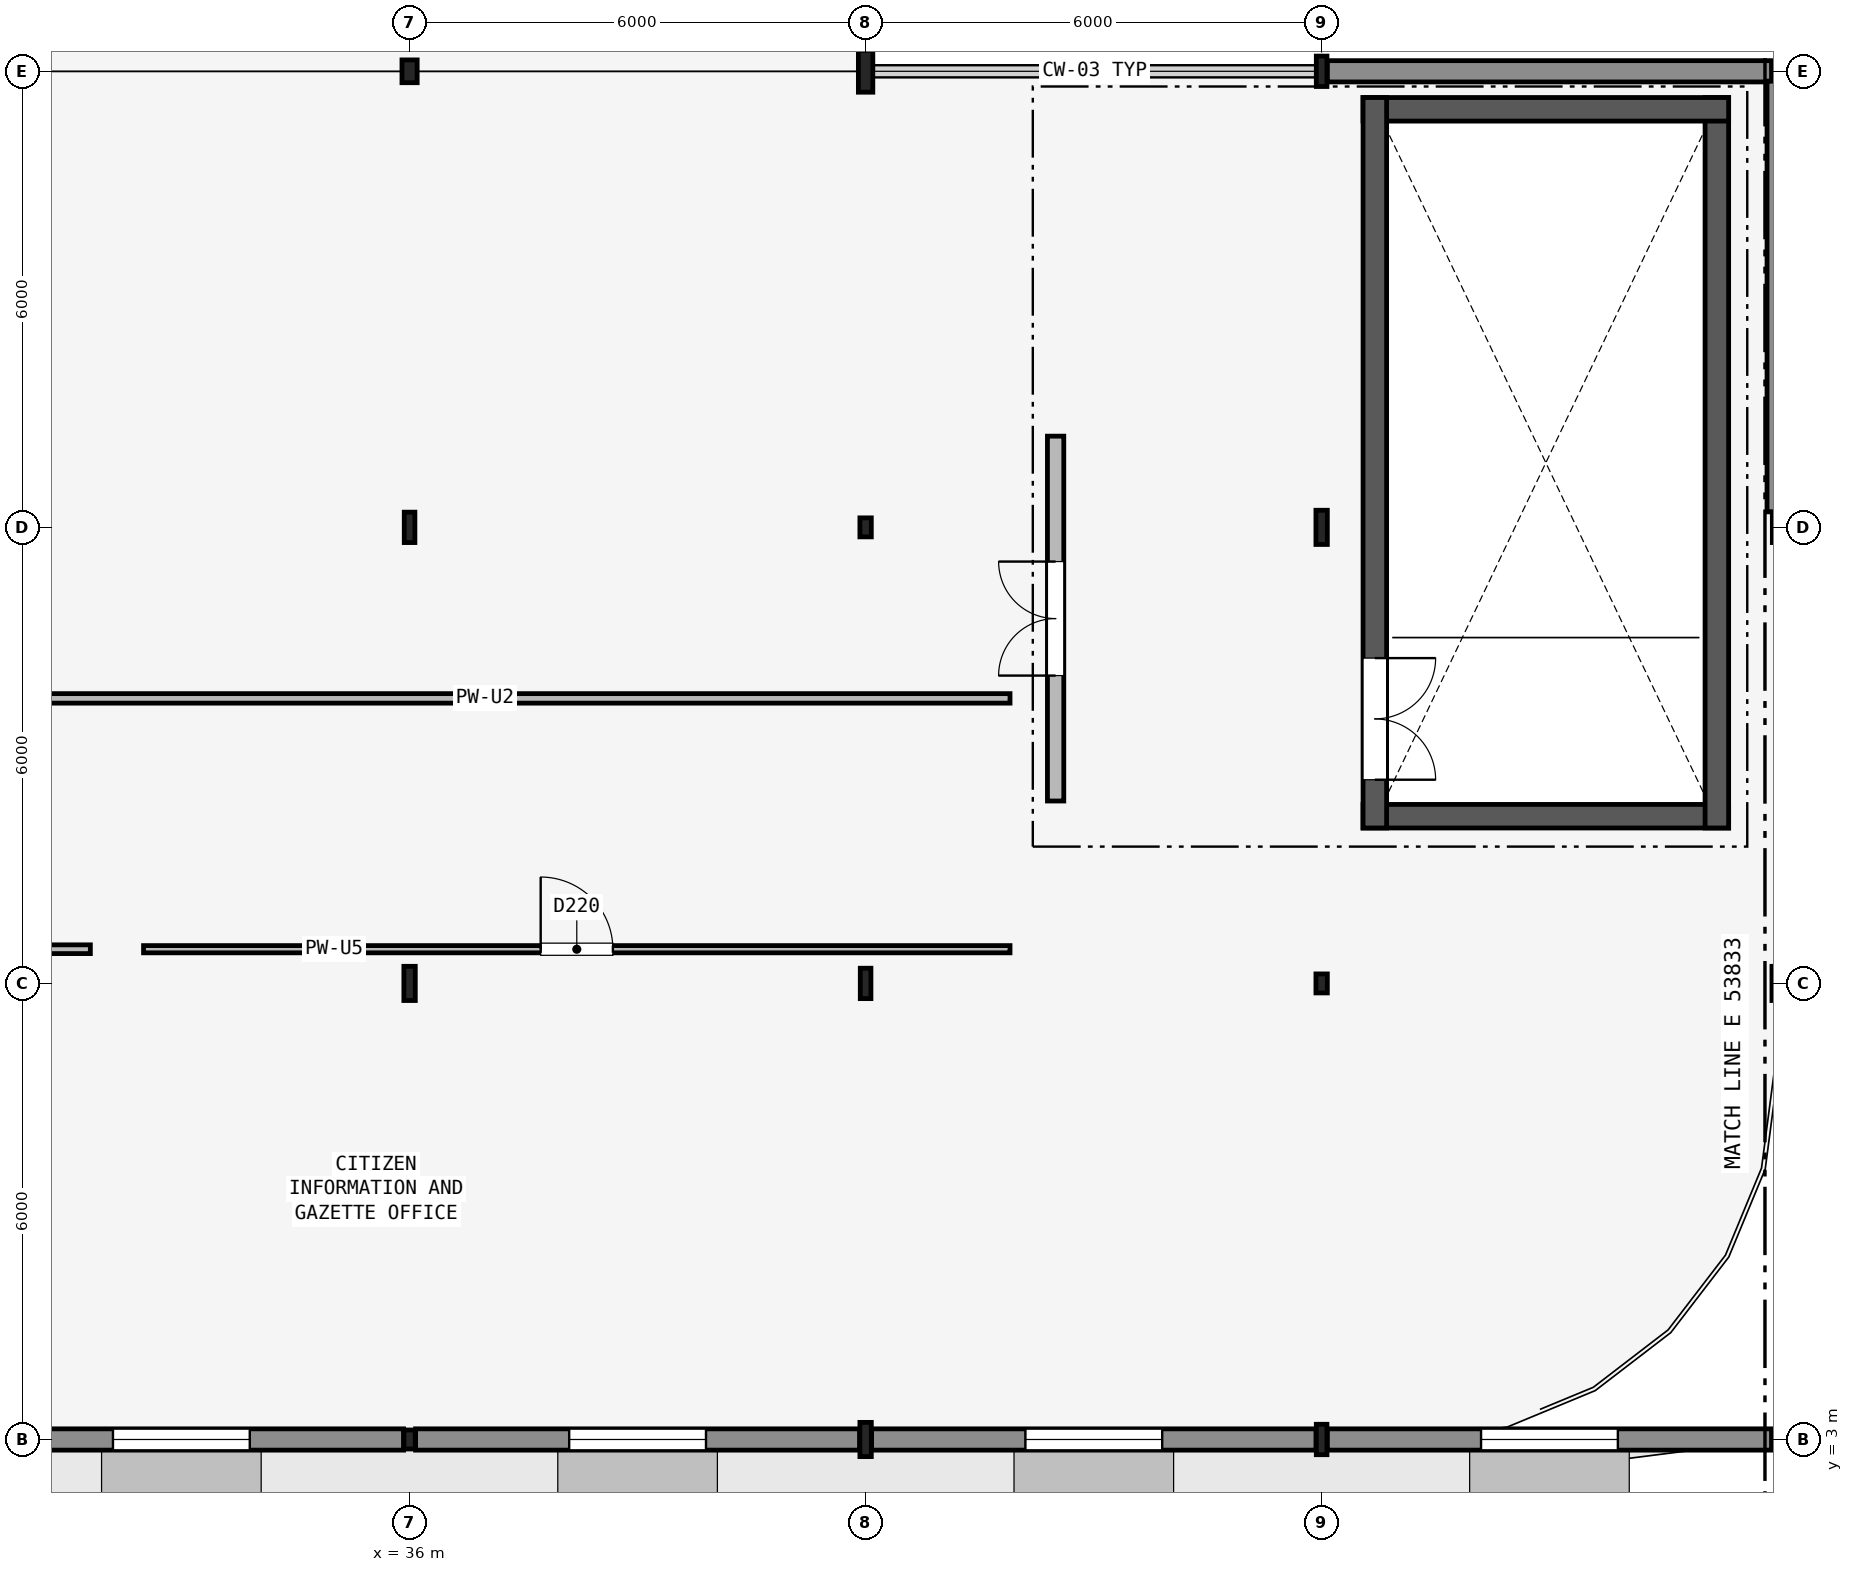
"""IFC4 building model, lengths in metres.
Left out: names, types, materials, properties, quantities, classifications, styles, units other than length and angle.
Written with IfcOpenShell. Run it as: python <this file> out.ifc"""

import sys

from ifc_helpers import new_model, si_unit, direction, frame, frame_2d, origin, origin_2d, place, context, subcontext, project, spatial, rectangle, hollow_rectangle, i_section, extrude, element, fill, save


model = new_model("IFC4")
c1 = context("Model", 3, precision=1e-05, world=origin(), true_north=direction((0.0, 1.0)))
c2 = subcontext(c1, "Body", "Model", "MODEL_VIEW")
j1 = project(units=[si_unit("LENGTHUNIT", "METRE"), si_unit("PLANEANGLEUNIT", "RADIAN")], contexts=[c1])
p1 = place(None, origin())
s1 = spatial("IfcSite", under=j1, at=p1, CompositionType="ELEMENT")
p2 = place(p1, origin())
s2 = spatial("IfcBuilding", under=s1, at=p2, CompositionType="ELEMENT")
p3 = place(p2, frame((0.0, 0.0, 9.3)))
s3 = spatial("IfcBuildingStorey", under=s2, at=p3, CompositionType="ELEMENT", Elevation=9.3)
p4 = place(p3, frame((36.0, 3.0, 0.0), z_axis=(0.0, 0.0, 1.0), x_axis=(1.0, 0.0, 0.0)))
e1 = element("IfcColumn", 1, at=p4, inside=s3, PredefinedType="COLUMN", context=c2, shape_type="SweptSolid", body=[
    extrude(hollow_rectangle(XDim=0.15, YDim=0.25, WallThickness=0.01, InnerFilletRadius=0.01, OuterFilletRadius=0.02, at=origin_2d()), origin(), (0.0, 0.0, 1.0), 4.2),
])
p5 = place(p3, frame((36.0, 9.0, 0.0), z_axis=(0.0, 0.0, 1.0), x_axis=(1.0, 0.0, 0.0)))
e2 = element("IfcColumn", 2, at=p5, inside=s3, PredefinedType="COLUMN", context=c2, shape_type="SweptSolid", body=[
    extrude(i_section(OverallWidth=0.15, OverallDepth=0.45, WebThickness=0.01, FlangeThickness=0.017, FilletRadius=0.015, at=origin_2d()), origin(), (0.0, 0.0, 1.0), 4.2),
])
p6 = place(p3, frame((36.0, 15.0, 0.0), z_axis=(0.0, 0.0, 1.0), x_axis=(1.0, 0.0, 0.0)))
e3 = element("IfcColumn", 3, at=p6, inside=s3, PredefinedType="COLUMN", context=c2, shape_type="SweptSolid", body=[
    extrude(i_section(OverallWidth=0.14, OverallDepth=0.4, WebThickness=0.009, FlangeThickness=0.016, FilletRadius=0.014, at=origin_2d()), origin(), (0.0, 0.0, 1.0), 4.2),
])
p7 = place(p3, frame((36.0, 21.0, 0.0), z_axis=(0.0, 0.0, 1.0), x_axis=(1.0, 0.0, 0.0)))
e4 = element("IfcColumn", 4, at=p7, inside=s3, PredefinedType="COLUMN", context=c2, shape_type="SweptSolid", body=[
    extrude(hollow_rectangle(XDim=0.2, YDim=0.3, WallThickness=0.012, InnerFilletRadius=0.012, OuterFilletRadius=0.024, at=origin_2d()), origin(), (0.0, 0.0, 1.0), 4.2),
])
p8 = place(p3, frame((42.0, 3.0, 0.0), z_axis=(0.0, 0.0, 1.0), x_axis=(1.0, 0.0, 0.0)))
e5 = element("IfcColumn", 5, at=p8, inside=s3, PredefinedType="COLUMN", context=c2, shape_type="SweptSolid", body=[
    extrude(i_section(OverallWidth=0.15, OverallDepth=0.45, WebThickness=0.01, FlangeThickness=0.017, FilletRadius=0.015, at=origin_2d()), origin(), (0.0, 0.0, 1.0), 4.2),
])
p9 = place(p3, frame((42.0, 9.0, 0.0), z_axis=(0.0, 0.0, 1.0), x_axis=(1.0, 0.0, 0.0)))
e6 = element("IfcColumn", 6, at=p9, inside=s3, PredefinedType="COLUMN", context=c2, shape_type="SweptSolid", body=[
    extrude(i_section(OverallWidth=0.14, OverallDepth=0.4, WebThickness=0.009, FlangeThickness=0.016, FilletRadius=0.014, at=origin_2d()), origin(), (0.0, 0.0, 1.0), 4.2),
])
p10 = place(p3, frame((42.0, 15.0, 0.0), z_axis=(0.0, 0.0, 1.0), x_axis=(1.0, 0.0, 0.0)))
e7 = element("IfcColumn", 7, at=p10, inside=s3, PredefinedType="COLUMN", context=c2, shape_type="SweptSolid", body=[
    extrude(hollow_rectangle(XDim=0.15, YDim=0.25, WallThickness=0.01, InnerFilletRadius=0.01, OuterFilletRadius=0.02, at=origin_2d()), origin(), (0.0, 0.0, 1.0), 4.2),
])
p11 = place(p3, frame((42.0, 21.0, 0.0), z_axis=(0.0, 0.0, 1.0), x_axis=(1.0, 0.0, 0.0)))
e8 = element("IfcColumn", 8, at=p11, inside=s3, PredefinedType="COLUMN", context=c2, shape_type="SweptSolid", body=[
    extrude(i_section(OverallWidth=0.19, OverallDepth=0.55, WebThickness=0.011, FlangeThickness=0.019, FilletRadius=0.018, at=origin_2d()), origin(), (0.0, 0.0, 1.0), 4.2),
])
p12 = place(p3, frame((48.0, 3.0, 0.0), z_axis=(0.0, 0.0, 1.0), x_axis=(1.0, 0.0, 0.0)))
e9 = element("IfcColumn", 9, at=p12, inside=s3, PredefinedType="COLUMN", context=c2, shape_type="SweptSolid", body=[
    extrude(i_section(OverallWidth=0.14, OverallDepth=0.4, WebThickness=0.009, FlangeThickness=0.016, FilletRadius=0.014, at=origin_2d()), origin(), (0.0, 0.0, 1.0), 4.2),
])
p13 = place(p3, frame((48.0, 9.0, 0.0), z_axis=(0.0, 0.0, 1.0), x_axis=(1.0, 0.0, 0.0)))
e10 = element("IfcColumn", 10, at=p13, inside=s3, PredefinedType="COLUMN", context=c2, shape_type="SweptSolid", body=[
    extrude(hollow_rectangle(XDim=0.15, YDim=0.25, WallThickness=0.01, InnerFilletRadius=0.01, OuterFilletRadius=0.02, at=origin_2d()), origin(), (0.0, 0.0, 1.0), 4.2),
])
p14 = place(p3, frame((48.0, 15.0, 0.0), z_axis=(0.0, 0.0, 1.0), x_axis=(1.0, 0.0, 0.0)))
e11 = element("IfcColumn", 11, at=p14, inside=s3, PredefinedType="COLUMN", context=c2, shape_type="SweptSolid", body=[
    extrude(i_section(OverallWidth=0.15, OverallDepth=0.45, WebThickness=0.01, FlangeThickness=0.017, FilletRadius=0.015, at=origin_2d()), origin(), (0.0, 0.0, 1.0), 4.2),
])
p15 = place(p3, frame((48.0, 21.0, 0.0), z_axis=(0.0, 0.0, 1.0), x_axis=(1.0, 0.0, 0.0)))
e12 = element("IfcColumn", 12, at=p15, inside=s3, PredefinedType="COLUMN", context=c2, shape_type="SweptSolid", body=[
    extrude(i_section(OverallWidth=0.14, OverallDepth=0.4, WebThickness=0.009, FlangeThickness=0.016, FilletRadius=0.014, at=origin_2d()), origin(), (0.0, 0.0, 1.0), 4.2),
])
p16 = place(p3, frame((54.0, 3.0, 0.0), z_axis=(0.0, 0.0, 1.0), x_axis=(1.0, 0.0, 0.0)))
e13 = element("IfcColumn", 13, at=p16, inside=s3, PredefinedType="COLUMN", context=c2, shape_type="SweptSolid", body=[
    extrude(hollow_rectangle(XDim=0.15, YDim=0.25, WallThickness=0.01, InnerFilletRadius=0.01, OuterFilletRadius=0.02, at=origin_2d()), origin(), (0.0, 0.0, 1.0), 4.2),
])
p17 = place(p3, frame((54.0, 9.0, 0.0), z_axis=(0.0, 0.0, 1.0), x_axis=(1.0, 0.0, 0.0)))
e14 = element("IfcColumn", 14, at=p17, inside=s3, PredefinedType="COLUMN", context=c2, shape_type="SweptSolid", body=[
    extrude(i_section(OverallWidth=0.15, OverallDepth=0.45, WebThickness=0.01, FlangeThickness=0.017, FilletRadius=0.015, at=origin_2d()), origin(), (0.0, 0.0, 1.0), 4.2),
])
p18 = place(p3, frame((54.0, 15.0, 0.0), z_axis=(0.0, 0.0, 1.0), x_axis=(1.0, 0.0, 0.0)))
e15 = element("IfcColumn", 15, at=p18, inside=s3, PredefinedType="COLUMN", context=c2, shape_type="SweptSolid", body=[
    extrude(i_section(OverallWidth=0.14, OverallDepth=0.4, WebThickness=0.009, FlangeThickness=0.016, FilletRadius=0.014, at=origin_2d()), origin(), (0.0, 0.0, 1.0), 4.2),
])
p19 = place(p3, frame((54.0, 21.0, 0.0), z_axis=(0.0, 0.0, 1.0), x_axis=(1.0, 0.0, 0.0)))
e16 = element("IfcColumn", 16, at=p19, inside=s3, PredefinedType="COLUMN", context=c2, shape_type="SweptSolid", body=[
    extrude(hollow_rectangle(XDim=0.15, YDim=0.25, WallThickness=0.01, InnerFilletRadius=0.01, OuterFilletRadius=0.02, at=origin_2d()), origin(), (0.0, 0.0, 1.0), 4.2),
])
p20 = place(p3, frame((30.074, 3.0, 0.0), z_axis=(0.0, 0.0, 1.0), x_axis=(1.0, 0.0, 0.0)))
e17 = element("IfcWall", 17, at=p20, inside=s3, PredefinedType="SOLIDWALL", context=c2, shape_type="SweptSolid", body=[
    extrude(rectangle(XDim=5.847, YDim=0.28, at=frame_2d((2.923, 0.0))), origin(), (0.0, 0.0, 1.0), 3.484),
])
p21 = place(p20, frame((2.023, 0.0, 0.9)))
e18 = element("IfcOpeningElement", 18, at=p21, cuts=e17, PredefinedType="OPENING", context=c2, shape_type="SweptSolid", body=[
    extrude(rectangle(XDim=1.8, YDim=1.5, at=frame_2d((0.9, 0.75))), frame((0.0, 0.15, 0.0), z_axis=(0.0, -1.0, 0.0), x_axis=(1.0, 0.0, 0.0)), (0.0, 0.0, 1.0), 0.3),
])
p22 = place(p3, frame((36.079, 3.0, 0.0), z_axis=(0.0, 0.0, 1.0), x_axis=(1.0, 0.0, 0.0)))
e19 = element("IfcWall", 19, at=p22, inside=s3, PredefinedType="SOLIDWALL", context=c2, shape_type="SweptSolid", body=[
    extrude(rectangle(XDim=5.842, YDim=0.28, at=frame_2d((2.921, 0.0))), origin(), (0.0, 0.0, 1.0), 3.484),
])
p23 = place(p22, frame((2.021, 0.0, 0.9)))
e20 = element("IfcOpeningElement", 20, at=p23, cuts=e19, PredefinedType="OPENING", context=c2, shape_type="SweptSolid", body=[
    extrude(rectangle(XDim=1.8, YDim=1.5, at=frame_2d((0.9, 0.75))), frame((0.0, 0.15, 0.0), z_axis=(0.0, -1.0, 0.0), x_axis=(1.0, 0.0, 0.0)), (0.0, 0.0, 1.0), 0.3),
])
p24 = place(p3, frame((42.079, 3.0, 0.0), z_axis=(0.0, 0.0, 1.0), x_axis=(1.0, 0.0, 0.0)))
e21 = element("IfcWall", 21, at=p24, inside=s3, PredefinedType="SOLIDWALL", context=c2, shape_type="SweptSolid", body=[
    extrude(rectangle(XDim=5.847, YDim=0.28, at=frame_2d((2.923, 0.0))), origin(), (0.0, 0.0, 1.0), 3.484),
])
p25 = place(p24, frame((2.023, 0.0, 0.9)))
e22 = element("IfcOpeningElement", 22, at=p25, cuts=e21, PredefinedType="OPENING", context=c2, shape_type="SweptSolid", body=[
    extrude(rectangle(XDim=1.8, YDim=1.5, at=frame_2d((0.9, 0.75))), frame((0.0, 0.15, 0.0), z_axis=(0.0, -1.0, 0.0), x_axis=(1.0, 0.0, 0.0)), (0.0, 0.0, 1.0), 0.3),
])
p26 = place(p3, frame((48.074, 3.0, 0.0), z_axis=(0.0, 0.0, 1.0), x_axis=(1.0, 0.0, 0.0)))
e23 = element("IfcWall", 23, at=p26, inside=s3, PredefinedType="SOLIDWALL", context=c2, shape_type="SweptSolid", body=[
    extrude(rectangle(XDim=5.847, YDim=0.28, at=frame_2d((2.923, 0.0))), origin(), (0.0, 0.0, 1.0), 3.484),
])
p27 = place(p26, frame((2.023, 0.0, 0.9)))
e24 = element("IfcOpeningElement", 24, at=p27, cuts=e23, PredefinedType="OPENING", context=c2, shape_type="SweptSolid", body=[
    extrude(rectangle(XDim=1.8, YDim=1.5, at=frame_2d((0.9, 0.75))), frame((0.0, 0.15, 0.0), z_axis=(0.0, -1.0, 0.0), x_axis=(1.0, 0.0, 0.0)), (0.0, 0.0, 1.0), 0.3),
])
p28 = place(p3, frame((48.074, 21.0, 0.0), z_axis=(0.0, 0.0, 1.0), x_axis=(1.0, 0.0, 0.0)))
e25 = element("IfcWall", 25, at=p28, inside=s3, PredefinedType="SOLIDWALL", context=c2, shape_type="SweptSolid", body=[
    extrude(rectangle(XDim=5.847, YDim=0.28, at=frame_2d((2.923, 0.0))), origin(), (0.0, 0.0, 1.0), 3.39),
])
p29 = place(p3, frame((54.0, 15.204, 0.0), z_axis=(0.0, 0.0, 1.0), x_axis=(0.0, 1.0, 0.0)))
e26 = element("IfcWall", 26, at=p29, inside=s3, PredefinedType="SOLIDWALL", context=c2, shape_type="SweptSolid", body=[
    extrude(rectangle(XDim=5.667, YDim=0.28, at=frame_2d((2.833, 0.0))), origin(), (0.0, 0.0, 1.0), 3.39),
])
p30 = place(p3, frame((48.545, 11.2, 0.0), z_axis=(0.0, 0.0, 1.0), x_axis=(1.0, 0.0, 0.0)))
e27 = element("IfcWall", 27, at=p30, inside=s3, PredefinedType="SHEAR", context=c2, shape_type="SweptSolid", body=[
    extrude(rectangle(XDim=4.81, YDim=0.31, at=frame_2d((2.405, 0.0))), origin(), (0.0, 0.0, 1.0), 4.06),
])
p31 = place(p3, frame((53.2, 11.045, 0.0), z_axis=(0.0, 0.0, 1.0), x_axis=(0.0, 1.0, 0.0)))
e28 = element("IfcWall", 28, at=p31, inside=s3, PredefinedType="SHEAR", context=c2, shape_type="SweptSolid", body=[
    extrude(rectangle(XDim=9.61, YDim=0.31, at=frame_2d((4.805, 0.0))), origin(), (0.0, 0.0, 1.0), 4.06),
])
p32 = place(p3, frame((53.355, 20.5, 0.0), z_axis=(0.0, 0.0, 1.0), x_axis=(-1.0, 0.0, 0.0)))
e29 = element("IfcWall", 29, at=p32, inside=s3, PredefinedType="SHEAR", context=c2, shape_type="SweptSolid", body=[
    extrude(rectangle(XDim=4.81, YDim=0.31, at=frame_2d((2.405, 0.0))), origin(), (0.0, 0.0, 1.0), 4.06),
])
p33 = place(p3, frame((48.7, 20.655, 0.0), z_axis=(0.0, 0.0, 1.0), x_axis=(0.0, -1.0, 0.0)))
e30 = element("IfcWall", 30, at=p33, inside=s3, PredefinedType="SHEAR", context=c2, shape_type="SweptSolid", body=[
    extrude(rectangle(XDim=9.61, YDim=0.31, at=frame_2d((4.805, 0.0))), origin(), (0.0, 0.0, 1.0), 4.06),
])
p34 = place(p33, frame((7.375, 0.0, 0.0)))
e31 = element("IfcOpeningElement", 31, at=p34, cuts=e30, PredefinedType="OPENING", context=c2, shape_type="SweptSolid", body=[
    extrude(rectangle(XDim=1.6, YDim=2.2, at=frame_2d((0.8, 1.1))), frame((0.0, 0.165, 0.0), z_axis=(0.0, -1.0, 0.0), x_axis=(1.0, 0.0, 0.0)), (0.0, 0.0, 1.0), 0.33),
])
p35 = place(p3, frame((44.5, 11.4, 0.0), z_axis=(0.0, 0.0, 1.0), x_axis=(0.0, 1.0, 0.0)))
e32 = element("IfcWall", 32, at=p35, inside=s3, PredefinedType="PARTITIONING", context=c2, shape_type="SweptSolid", body=[
    extrude(rectangle(XDim=4.8, YDim=0.215, at=frame_2d((2.4, 0.0))), origin(), (0.0, 0.0, 1.0), 3.44),
])
p36 = place(p35, frame((1.65, 0.0, 0.0)))
e33 = element("IfcOpeningElement", 33, at=p36, cuts=e32, PredefinedType="OPENING", context=c2, shape_type="SweptSolid", body=[
    extrude(rectangle(XDim=1.5, YDim=2.15, at=frame_2d((0.75, 1.075))), frame((0.0, 0.117, 0.0), z_axis=(0.0, -1.0, 0.0), x_axis=(1.0, 0.0, 0.0)), (0.0, 0.0, 1.0), 0.235),
])
p37 = place(p3, frame((12.5, 9.45, 0.0), z_axis=(0.0, 0.0, 1.0), x_axis=(1.0, 0.0, 0.0)))
e34 = element("IfcWall", 34, at=p37, inside=s3, PredefinedType="PARTITIONING", context=c2, shape_type="SweptSolid", body=[
    extrude(rectangle(XDim=19.3, YDim=0.115, at=frame_2d((9.65, 0.0))), origin(), (0.0, 0.0, 1.0), 3.49),
])
p38 = place(p37, frame((9.15, 0.0, 0.0)))
e35 = element("IfcOpeningElement", 35, at=p38, cuts=e34, PredefinedType="OPENING", context=c2, shape_type="SweptSolid", body=[
    extrude(rectangle(XDim=1.0, YDim=2.15, at=frame_2d((0.5, 1.075))), frame((0.0, 0.067, 0.0), z_axis=(0.0, -1.0, 0.0), x_axis=(1.0, 0.0, 0.0)), (0.0, 0.0, 1.0), 0.135),
])
p39 = place(p3, frame((32.5, 9.45, 0.0), z_axis=(0.0, 0.0, 1.0), x_axis=(1.0, 0.0, 0.0)))
e36 = element("IfcWall", 36, at=p39, inside=s3, PredefinedType="PARTITIONING", context=c2, shape_type="SweptSolid", body=[
    extrude(rectangle(XDim=11.4, YDim=0.095, at=frame_2d((5.7, 0.0))), origin(), (0.0, 0.0, 1.0), 3.49),
])
p40 = place(p39, frame((5.225, 0.0, 0.0)))
e37 = element("IfcOpeningElement", 37, at=p40, cuts=e36, PredefinedType="OPENING", context=c2, shape_type="SweptSolid", body=[
    extrude(rectangle(XDim=0.95, YDim=2.15, at=frame_2d((0.475, 1.075))), frame((0.0, 0.057, 0.0), z_axis=(0.0, -1.0, 0.0), x_axis=(1.0, 0.0, 0.0)), (0.0, 0.0, 1.0), 0.115),
])
p41 = place(p3, frame((43.9, 12.75, 0.0), z_axis=(0.0, 0.0, 1.0), x_axis=(-1.0, 0.0, 0.0)))
e38 = element("IfcWall", 38, at=p41, inside=s3, PredefinedType="PARTITIONING", context=c2, shape_type="SweptSolid", body=[
    extrude(rectangle(XDim=31.4, YDim=0.125, at=frame_2d((15.7, 0.0))), origin(), (0.0, 0.0, 1.0), 3.49),
])
p42 = place(p41, frame((15.175, 0.0, 0.0)))
e39 = element("IfcOpeningElement", 39, at=p42, cuts=e38, PredefinedType="OPENING", context=c2, shape_type="SweptSolid", body=[
    extrude(rectangle(XDim=1.05, YDim=2.2, at=frame_2d((0.525, 1.1))), frame((0.0, 0.073, 0.0), z_axis=(0.0, -1.0, 0.0), x_axis=(1.0, 0.0, 0.0)), (0.0, 0.0, 1.0), 0.145),
])
p43 = place(p41, frame((16.875, 0.0, 0.9)))
e40 = element("IfcOpeningElement", 40, at=p43, cuts=e38, PredefinedType="OPENING", context=c2, shape_type="SweptSolid", body=[
    extrude(rectangle(XDim=2.2, YDim=1.4, at=frame_2d((1.1, 0.7))), frame((0.0, 0.073, 0.0), z_axis=(0.0, -1.0, 0.0), x_axis=(1.0, 0.0, 0.0)), (0.0, 0.0, 1.0), 0.145),
])
p44 = place(p21, origin())
e41 = element("IfcWindow", 41, at=p44, inside=s3, PartitioningType="SINGLE_PANEL", PredefinedType="WINDOW", context=c2, shape_type="SweptSolid", body=[
    extrude(rectangle(XDim=1.8, YDim=1.5, at=frame_2d((0.9, 0.75))), frame((0.0, 0.03, 0.0), z_axis=(0.0, -1.0, 0.0), x_axis=(1.0, 0.0, 0.0)), (0.0, 0.0, 1.0), 0.06),
])
fill(e18, e41)
p45 = place(p23, origin())
e42 = element("IfcWindow", 42, at=p45, inside=s3, PartitioningType="SINGLE_PANEL", PredefinedType="WINDOW", context=c2, shape_type="SweptSolid", body=[
    extrude(rectangle(XDim=1.8, YDim=1.5, at=frame_2d((0.9, 0.75))), frame((0.0, 0.03, 0.0), z_axis=(0.0, -1.0, 0.0), x_axis=(1.0, 0.0, 0.0)), (0.0, 0.0, 1.0), 0.06),
])
fill(e20, e42)
p46 = place(p25, origin())
e43 = element("IfcWindow", 43, at=p46, inside=s3, PartitioningType="SINGLE_PANEL", PredefinedType="WINDOW", context=c2, shape_type="SweptSolid", body=[
    extrude(rectangle(XDim=1.8, YDim=1.5, at=frame_2d((0.9, 0.75))), frame((0.0, 0.03, 0.0), z_axis=(0.0, -1.0, 0.0), x_axis=(1.0, 0.0, 0.0)), (0.0, 0.0, 1.0), 0.06),
])
fill(e22, e43)
p47 = place(p27, origin())
e44 = element("IfcWindow", 44, at=p47, inside=s3, PartitioningType="SINGLE_PANEL", PredefinedType="WINDOW", context=c2, shape_type="SweptSolid", body=[
    extrude(rectangle(XDim=1.8, YDim=1.5, at=frame_2d((0.9, 0.75))), frame((0.0, 0.03, 0.0), z_axis=(0.0, -1.0, 0.0), x_axis=(1.0, 0.0, 0.0)), (0.0, 0.0, 1.0), 0.06),
])
fill(e24, e44)
p48 = place(p34, origin())
e45 = element("IfcDoor", 45, at=p48, inside=s3, OperationType="DOUBLE_DOOR_SINGLE_SWING", PredefinedType="DOOR", context=c2, shape_type="SweptSolid", body=[
    extrude(rectangle(XDim=1.6, YDim=2.2, at=frame_2d((0.8, 1.1))), frame((0.0, 0.025, 0.0), z_axis=(0.0, -1.0, 0.0), x_axis=(1.0, 0.0, 0.0)), (0.0, 0.0, 1.0), 0.05),
])
fill(e31, e45)
p49 = place(p36, origin())
e46 = element("IfcDoor", 46, at=p49, inside=s3, OperationType="DOUBLE_DOOR_SINGLE_SWING", PredefinedType="DOOR", context=c2, shape_type="SweptSolid", body=[
    extrude(rectangle(XDim=1.5, YDim=2.15, at=frame_2d((0.75, 1.075))), frame((0.0, 0.025, 0.0), z_axis=(0.0, -1.0, 0.0), x_axis=(1.0, 0.0, 0.0)), (0.0, 0.0, 1.0), 0.05),
])
fill(e33, e46)
p50 = place(p40, origin())
e47 = element("IfcDoor", 47, at=p50, inside=s3, OperationType="SINGLE_SWING_LEFT", PredefinedType="DOOR", context=c2, shape_type="SweptSolid", body=[
    extrude(rectangle(XDim=0.95, YDim=2.15, at=frame_2d((0.475, 1.075))), frame((0.0, 0.025, 0.0), z_axis=(0.0, -1.0, 0.0), x_axis=(1.0, 0.0, 0.0)), (0.0, 0.0, 1.0), 0.05),
])
fill(e37, e47)
save(model, sys.argv[1])
